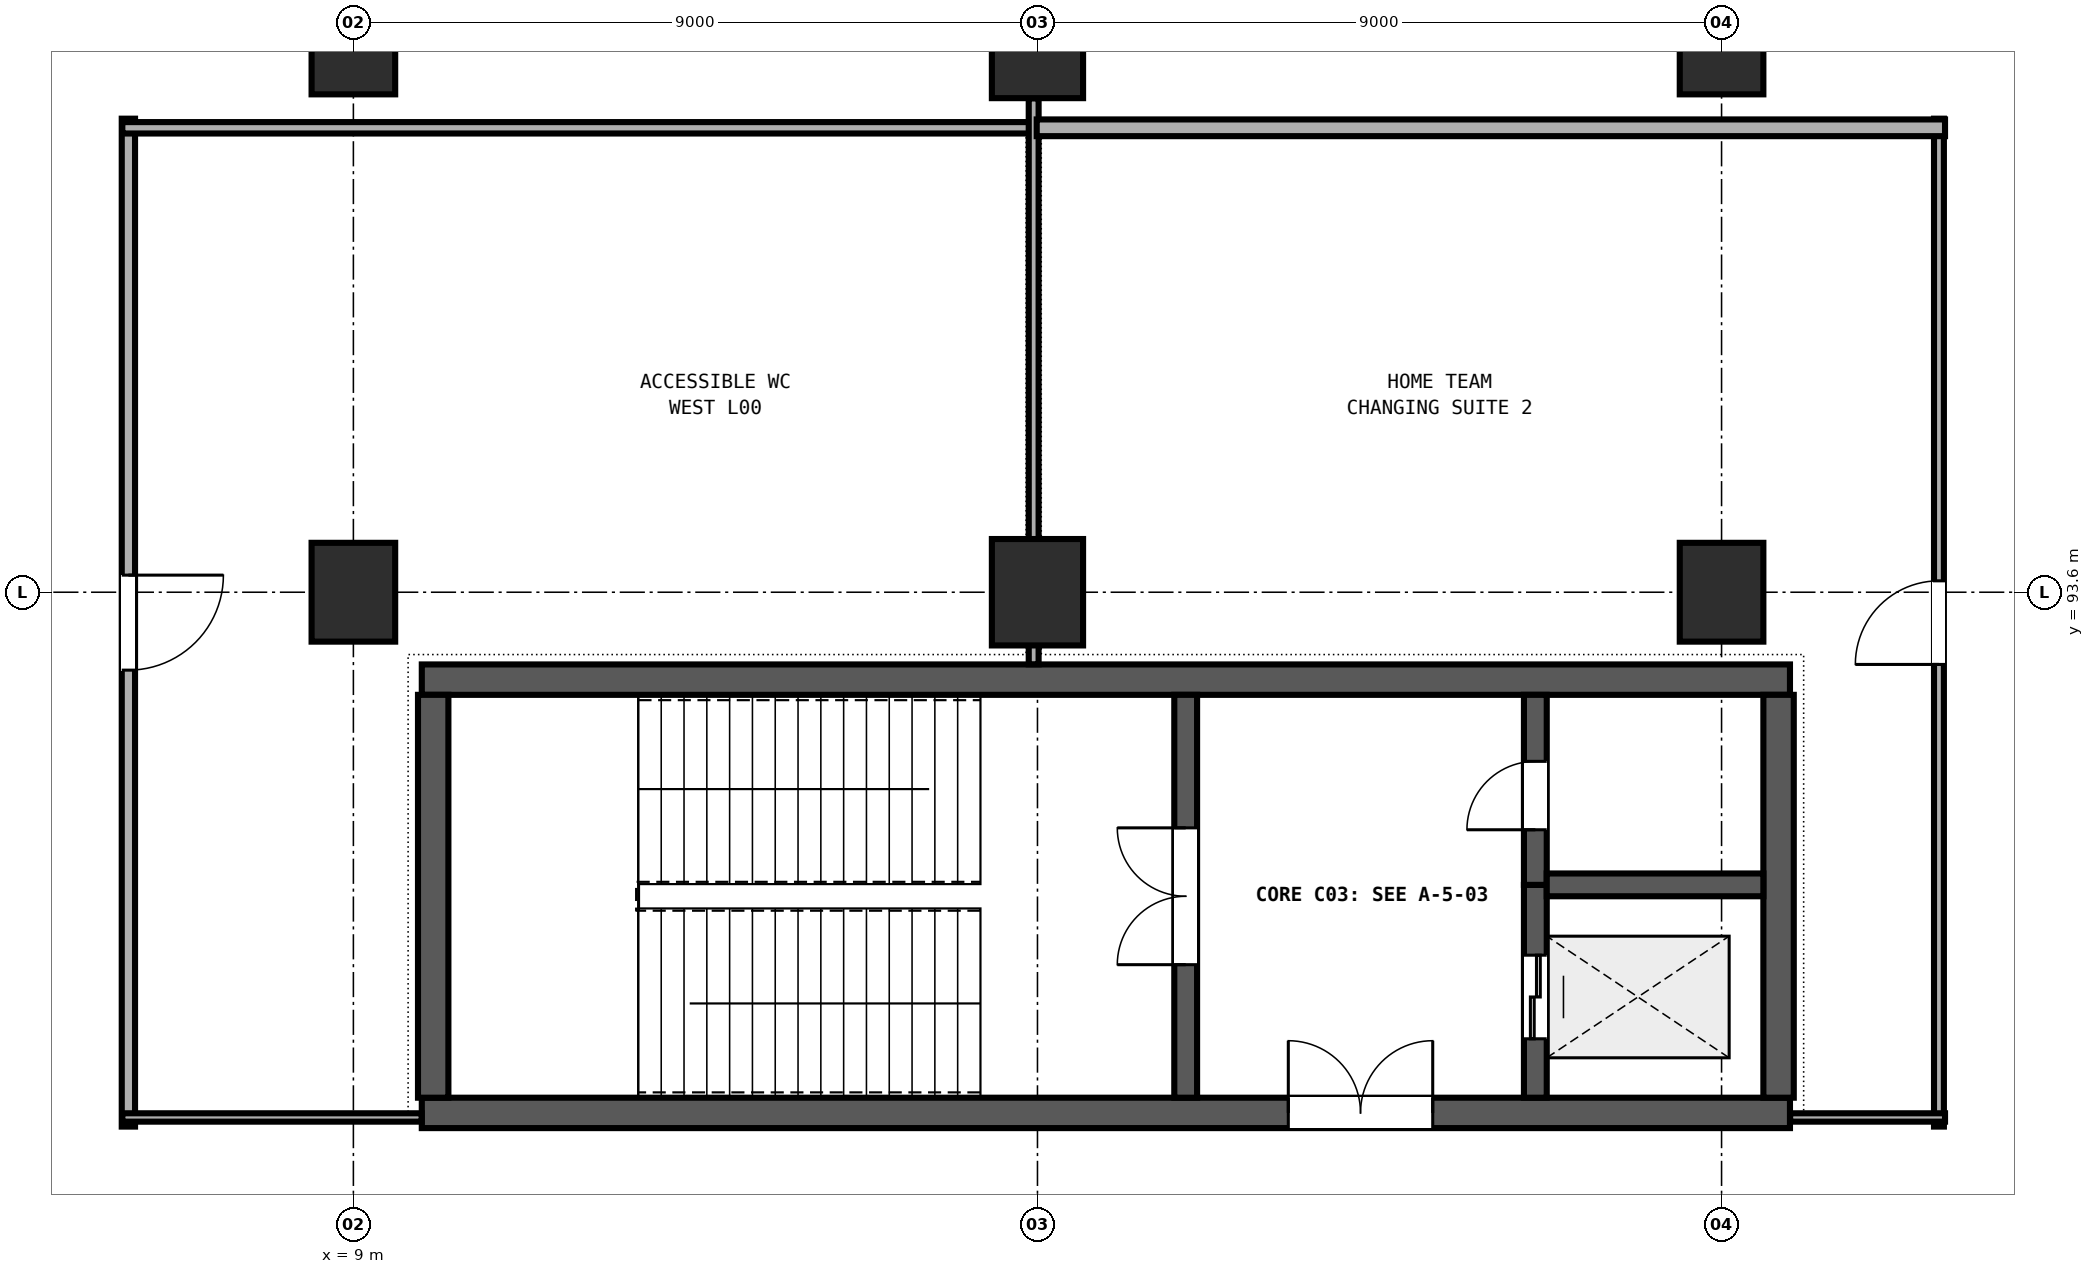
"""IFC4 building model, lengths in metres.
Left out: names, types, materials, properties, quantities, classifications, styles, units other than length and angle.
Written with IfcOpenShell. Run it as: python <this file> out.ifc"""

import sys

from ifc_helpers import new_model, si_unit, direction, frame, frame_2d, origin, origin_2d, place, context, subcontext, project, spatial, rectangle, extrude, element, fill, save


model = new_model("IFC4")
c1 = context("Model", 3, precision=1e-05, world=origin(), true_north=direction((0.0, 1.0)))
c2 = subcontext(c1, "Body", "Model", "MODEL_VIEW")
j1 = project(units=[si_unit("LENGTHUNIT", "METRE"), si_unit("PLANEANGLEUNIT", "RADIAN")], contexts=[c1])
p1 = place(None, origin())
s1 = spatial("IfcSite", under=j1, at=p1, CompositionType="ELEMENT")
p2 = place(p1, origin())
s2 = spatial("IfcBuilding", under=s1, at=p2, CompositionType="ELEMENT")
p3 = place(p2, origin())
s3 = spatial("IfcBuildingStorey", under=s2, at=p3, CompositionType="ELEMENT", Elevation=0.0)
for number, where, z_axis, x_axis in (
    (1, (9.0, 93.6, 0.0), (0.0, 0.0, 1.0), (1.0, 0.0, 0.0)),
    (2, (9.0, 100.8, 0.0), (0.0, 0.0, 1.0), (1.0, 0.0, 0.0)),
):
    element("IfcColumn", number, at=place(p3, frame(where, z_axis=z_axis, x_axis=x_axis)), inside=s3, PredefinedType="COLUMN", context=c2, shape_type="SweptSolid", body=[
        extrude(rectangle(XDim=1.1, YDim=1.3, at=origin_2d()), origin(), (0.0, 0.0, 1.0), 4.8),
    ])
for number, where, z_axis, x_axis in (
    (3, (18.0, 93.6, 0.0), (0.0, 0.0, 1.0), (1.0, 0.0, 0.0)),
    (4, (18.0, 100.8, 0.0), (0.0, 0.0, 1.0), (1.0, 0.0, 0.0)),
):
    element("IfcColumn", number, at=place(p3, frame(where, z_axis=z_axis, x_axis=x_axis)), inside=s3, PredefinedType="COLUMN", context=c2, shape_type="SweptSolid", body=[
        extrude(rectangle(XDim=1.2, YDim=1.4, at=origin_2d()), origin(), (0.0, 0.0, 1.0), 4.8),
    ])
for number, where, z_axis, x_axis in (
    (5, (27.0, 93.6, 0.0), (0.0, 0.0, 1.0), (1.0, 0.0, 0.0)),
    (6, (27.0, 100.8, 0.0), (0.0, 0.0, 1.0), (1.0, 0.0, 0.0)),
):
    element("IfcColumn", number, at=place(p3, frame(where, z_axis=z_axis, x_axis=x_axis)), inside=s3, PredefinedType="COLUMN", context=c2, shape_type="SweptSolid", body=[
        extrude(rectangle(XDim=1.1, YDim=1.3, at=origin_2d()), origin(), (0.0, 0.0, 1.0), 4.8),
    ])
p4 = place(p3, frame((9.9, 86.75, 0.0), z_axis=(0.0, 0.0, 1.0), x_axis=(1.0, 0.0, 0.0)))
e7 = element("IfcWall", 7, at=p4, inside=s3, PredefinedType="SHEAR", context=c2, shape_type="SweptSolid", body=[
    extrude(rectangle(XDim=18.0, YDim=0.4, at=frame_2d((9.0, 0.0))), origin(), (0.0, 0.0, 1.0), 4.5),
])
p5 = place(p4, frame((11.4, 0.0, 0.0)))
e8 = element("IfcOpeningElement", 8, at=p5, cuts=e7, PredefinedType="OPENING", context=c2, shape_type="SweptSolid", body=[
    extrude(rectangle(XDim=1.9, YDim=2.25, at=frame_2d((0.95, 1.125))), frame((0.0, 0.21, 0.0), z_axis=(0.0, -1.0, 0.0), x_axis=(1.0, 0.0, 0.0)), (0.0, 0.0, 1.0), 0.42),
])
p6 = place(p3, frame((27.9, 92.45, 0.0), z_axis=(0.0, 0.0, 1.0), x_axis=(-1.0, 0.0, 0.0)))
e9 = element("IfcWall", 9, at=p6, inside=s3, PredefinedType="SHEAR", context=c2, shape_type="SweptSolid", body=[
    extrude(rectangle(XDim=18.0, YDim=0.4, at=frame_2d((9.0, 0.0))), origin(), (0.0, 0.0, 1.0), 4.5),
])
for number, where, z_axis, x_axis in (
    (10, (10.05, 92.25, 0.0), (0.0, 0.0, 1.0), (0.0, -1.0, 0.0)),
    (11, (27.75, 86.95, 0.0), (0.0, 0.0, 1.0), (0.0, 1.0, 0.0)),
):
    element("IfcWall", number, at=place(p3, frame(where, z_axis=z_axis, x_axis=x_axis)), inside=s3, PredefinedType="SHEAR", context=c2, shape_type="SweptSolid", body=[
        extrude(rectangle(XDim=5.3, YDim=0.4, at=frame_2d((2.65, 0.0))), origin(), (0.0, 0.0, 1.0), 4.5),
    ])
p7 = place(p3, frame((19.95, 86.95, 0.0), z_axis=(0.0, 0.0, 1.0), x_axis=(0.0, 1.0, 0.0)))
e12 = element("IfcWall", 12, at=p7, inside=s3, PredefinedType="SHEAR", context=c2, shape_type="SweptSolid", body=[
    extrude(rectangle(XDim=5.3, YDim=0.3, at=frame_2d((2.65, 0.0))), origin(), (0.0, 0.0, 1.0), 4.5),
])
p8 = place(p7, frame((1.75, 0.0, 0.0)))
e13 = element("IfcOpeningElement", 13, at=p8, cuts=e12, PredefinedType="OPENING", context=c2, shape_type="SweptSolid", body=[
    extrude(rectangle(XDim=1.8, YDim=2.25, at=frame_2d((0.9, 1.125))), frame((0.0, 0.16, 0.0), z_axis=(0.0, -1.0, 0.0), x_axis=(1.0, 0.0, 0.0)), (0.0, 0.0, 1.0), 0.32),
])
p9 = place(p3, frame((24.55, 86.95, 0.0), z_axis=(0.0, 0.0, 1.0), x_axis=(0.0, 1.0, 0.0)))
e14 = element("IfcWall", 14, at=p9, inside=s3, PredefinedType="SHEAR", context=c2, shape_type="SweptSolid", body=[
    extrude(rectangle(XDim=2.8, YDim=0.3, at=frame_2d((1.4, 0.0))), origin(), (0.0, 0.0, 1.0), 4.5),
])
p10 = place(p9, frame((0.775, 0.0, 0.0)))
e15 = element("IfcOpeningElement", 15, at=p10, cuts=e14, PredefinedType="OPENING", context=c2, shape_type="SweptSolid", body=[
    extrude(rectangle(XDim=1.1, YDim=2.1, at=frame_2d((0.55, 1.05))), frame((0.0, 0.16, 0.0), z_axis=(0.0, -1.0, 0.0), x_axis=(1.0, 0.0, 0.0)), (0.0, 0.0, 1.0), 0.32),
])
p11 = place(p3, frame((24.55, 89.75, 0.0), z_axis=(0.0, 0.0, 1.0), x_axis=(0.0, 1.0, 0.0)))
e16 = element("IfcWall", 16, at=p11, inside=s3, PredefinedType="SHEAR", context=c2, shape_type="SweptSolid", body=[
    extrude(rectangle(XDim=2.5, YDim=0.3, at=frame_2d((1.25, 0.0))), origin(), (0.0, 0.0, 1.0), 4.5),
])
p12 = place(p11, frame((0.725, 0.0, 0.0)))
e17 = element("IfcOpeningElement", 17, at=p12, cuts=e16, PredefinedType="OPENING", context=c2, shape_type="SweptSolid", body=[
    extrude(rectangle(XDim=0.9, YDim=2.1, at=frame_2d((0.45, 1.05))), frame((0.0, 0.16, 0.0), z_axis=(0.0, -1.0, 0.0), x_axis=(1.0, 0.0, 0.0)), (0.0, 0.0, 1.0), 0.32),
])
p13 = place(p3, frame((24.7, 89.75, 0.0), z_axis=(0.0, 0.0, 1.0), x_axis=(1.0, 0.0, 0.0)))
e18 = element("IfcWall", 18, at=p13, inside=s3, PredefinedType="SHEAR", context=c2, shape_type="SweptSolid", body=[
    extrude(rectangle(XDim=2.85, YDim=0.3, at=frame_2d((1.425, 0.0))), origin(), (0.0, 0.0, 1.0), 4.5),
])
p14 = place(p3, frame((6.04, 99.83, 0.0), z_axis=(0.0, 0.0, 1.0), x_axis=(0.0, -1.0, 0.0)))
e19 = element("IfcWall", 19, at=p14, inside=s3, PredefinedType="PARTITIONING", context=c2, shape_type="SweptSolid", body=[
    extrude(rectangle(XDim=13.26, YDim=0.175, at=frame_2d((6.63, 0.0))), origin(), (0.0, 0.0, 1.0), 3.28),
])
p15 = place(p14, frame((6.005, 0.0, 0.0)))
e20 = element("IfcOpeningElement", 20, at=p15, cuts=e19, PredefinedType="OPENING", context=c2, shape_type="SweptSolid", body=[
    extrude(rectangle(XDim=1.25, YDim=2.15, at=frame_2d((0.625, 1.075))), frame((0.0, 0.097, 0.0), z_axis=(0.0, -1.0, 0.0), x_axis=(1.0, 0.0, 0.0)), (0.0, 0.0, 1.0), 0.195),
])
p16 = place(p3, frame((5.96, 99.71, 0.0), z_axis=(0.0, 0.0, 1.0), x_axis=(1.0, 0.0, 0.0)))
e21 = element("IfcWall", 21, at=p16, inside=s3, PredefinedType="PARTITIONING", context=c2, shape_type="SweptSolid", body=[
    extrude(rectangle(XDim=11.95, YDim=0.15, at=frame_2d((5.975, 0.0))), origin(), (0.0, 0.0, 1.0), 3.28),
])
p17 = place(p3, frame((17.95, 100.098, 0.0), z_axis=(0.0, 0.0, 1.0), x_axis=(0.0, -1.0, 0.0)))
e22 = element("IfcWall", 22, at=p17, inside=s3, PredefinedType="PARTITIONING", context=c2, shape_type="SweptSolid", body=[
    extrude(rectangle(XDim=7.446, YDim=0.13, at=frame_2d((3.723, 0.0))), origin(), (0.0, 0.0, 1.0), 3.28),
])
p18 = place(p3, frame((9.898, 86.69, 0.0), z_axis=(0.0, 0.0, 1.0), x_axis=(-1.0, 0.0, 0.0)))
e23 = element("IfcWall", 23, at=p18, inside=s3, PredefinedType="PARTITIONING", context=c2, shape_type="SweptSolid", body=[
    extrude(rectangle(XDim=3.938, YDim=0.11, at=frame_2d((1.969, 0.0))), origin(), (0.0, 0.0, 1.0), 3.28),
])
p19 = place(p3, frame((29.86, 86.57, 0.0), z_axis=(0.0, 0.0, 1.0), x_axis=(0.0, 1.0, 0.0)))
e24 = element("IfcWall", 24, at=p19, inside=s3, PredefinedType="PARTITIONING", context=c2, shape_type="SweptSolid", body=[
    extrude(rectangle(XDim=13.26, YDim=0.13, at=frame_2d((6.63, 0.0))), origin(), (0.0, 0.0, 1.0), 3.28),
])
p20 = place(p19, frame((6.08, 0.0, 0.0)))
e25 = element("IfcOpeningElement", 25, at=p20, cuts=e24, PredefinedType="OPENING", context=c2, shape_type="SweptSolid", body=[
    extrude(rectangle(XDim=1.1, YDim=2.1, at=frame_2d((0.55, 1.05))), frame((0.0, 0.075, 0.0), z_axis=(0.0, -1.0, 0.0), x_axis=(1.0, 0.0, 0.0)), (0.0, 0.0, 1.0), 0.15),
])
p21 = place(p3, frame((29.94, 86.69, 0.0), z_axis=(0.0, 0.0, 1.0), x_axis=(-1.0, 0.0, 0.0)))
e26 = element("IfcWall", 26, at=p21, inside=s3, PredefinedType="PARTITIONING", context=c2, shape_type="SweptSolid", body=[
    extrude(rectangle(XDim=2.038, YDim=0.11, at=frame_2d((1.019, 0.0))), origin(), (0.0, 0.0, 1.0), 3.28),
])
p22 = place(p3, frame((17.99, 99.71, 0.0), z_axis=(0.0, 0.0, 1.0), x_axis=(1.0, 0.0, 0.0)))
e27 = element("IfcWall", 27, at=p22, inside=s3, PredefinedType="PARTITIONING", context=c2, shape_type="SweptSolid", body=[
    extrude(rectangle(XDim=11.95, YDim=0.22, at=frame_2d((5.975, 0.0))), origin(), (0.0, 0.0, 1.0), 3.28),
])
p23 = place(p8, origin())
e28 = element("IfcDoor", 28, at=p23, inside=s3, OperationType="DOUBLE_DOOR_SINGLE_SWING", PredefinedType="DOOR", context=c2, shape_type="SweptSolid", body=[
    extrude(rectangle(XDim=1.8, YDim=2.25, at=frame_2d((0.9, 1.125))), frame((0.0, 0.025, 0.0), z_axis=(0.0, -1.0, 0.0), x_axis=(1.0, 0.0, 0.0)), (0.0, 0.0, 1.0), 0.05),
])
fill(e13, e28)
p24 = place(p12, origin())
e29 = element("IfcDoor", 29, at=p24, inside=s3, OperationType="SINGLE_SWING_LEFT", PredefinedType="DOOR", context=c2, shape_type="SweptSolid", body=[
    extrude(rectangle(XDim=0.9, YDim=2.1, at=frame_2d((0.45, 1.05))), frame((0.0, 0.025, 0.0), z_axis=(0.0, -1.0, 0.0), x_axis=(1.0, 0.0, 0.0)), (0.0, 0.0, 1.0), 0.05),
])
fill(e17, e29)
p25 = place(p10, origin())
e30 = element("IfcDoor", 30, at=p25, inside=s3, OperationType="DOUBLE_DOOR_SLIDING", PredefinedType="DOOR", context=c2, shape_type="SweptSolid", body=[
    extrude(rectangle(XDim=1.1, YDim=2.1, at=frame_2d((0.55, 1.05))), frame((0.0, 0.025, 0.0), z_axis=(0.0, -1.0, 0.0), x_axis=(1.0, 0.0, 0.0)), (0.0, 0.0, 1.0), 0.05),
])
fill(e15, e30)
p26 = place(p5, origin())
e31 = element("IfcDoor", 31, at=p26, inside=s3, OperationType="DOUBLE_DOOR_SINGLE_SWING", PredefinedType="DOOR", context=c2, shape_type="SweptSolid", body=[
    extrude(rectangle(XDim=1.9, YDim=2.25, at=frame_2d((0.95, 1.125))), frame((0.0, 0.025, 0.0), z_axis=(0.0, -1.0, 0.0), x_axis=(1.0, 0.0, 0.0)), (0.0, 0.0, 1.0), 0.05),
])
fill(e8, e31)
p27 = place(p15, origin())
e32 = element("IfcDoor", 32, at=p27, inside=s3, OperationType="SINGLE_SWING_LEFT", PredefinedType="DOOR", context=c2, shape_type="SweptSolid", body=[
    extrude(rectangle(XDim=1.25, YDim=2.15, at=frame_2d((0.625, 1.075))), frame((0.0, 0.025, 0.0), z_axis=(0.0, -1.0, 0.0), x_axis=(1.0, 0.0, 0.0)), (0.0, 0.0, 1.0), 0.05),
])
fill(e20, e32)
p28 = place(p20, origin())
e33 = element("IfcDoor", 33, at=p28, inside=s3, OperationType="SINGLE_SWING_LEFT", PredefinedType="DOOR", context=c2, shape_type="SweptSolid", body=[
    extrude(rectangle(XDim=1.1, YDim=2.1, at=frame_2d((0.55, 1.05))), frame((0.0, 0.025, 0.0), z_axis=(0.0, -1.0, 0.0), x_axis=(1.0, 0.0, 0.0)), (0.0, 0.0, 1.0), 0.05),
])
fill(e25, e33)
save(model, sys.argv[1])
